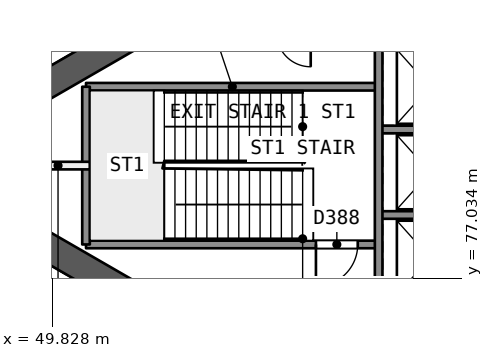
"""IFC4 building model, lengths in metres.
Left out: names, types, materials, properties, quantities, classifications, styles, units other than length and angle.
Written with IfcOpenShell. Run it as: python <this file> out.ifc"""

import sys

from ifc_helpers import new_model, si_unit, direction, frame, frame_2d, origin, place, context, subcontext, project, spatial, rectangle, extrude, element, fill, save


model = new_model("IFC4")
c1 = context("Model", 3, precision=1e-05, world=origin(), true_north=direction((0.0, 1.0)))
c2 = subcontext(c1, "Body", "Model", "MODEL_VIEW")
j1 = project(units=[si_unit("LENGTHUNIT", "METRE"), si_unit("PLANEANGLEUNIT", "RADIAN")], contexts=[c1])
p1 = place(None, origin())
s1 = spatial("IfcSite", under=j1, at=p1, CompositionType="ELEMENT")
p2 = place(p1, origin())
s2 = spatial("IfcBuilding", under=s1, at=p2, CompositionType="ELEMENT")
p3 = place(p2, frame((0.0, 0.0, 68.4)))
s3 = spatial("IfcBuildingStorey", under=s2, at=p3, CompositionType="ELEMENT", Elevation=68.4)
p4 = place(p3, frame((60.673, 88.477, 0.0), z_axis=(0.0, 0.0, 1.0), x_axis=(-0.8660248072, -0.500001033313, 0.0)))
e1 = element("IfcWall", 1, at=p4, inside=s3, PredefinedType="SHEAR", context=c2, shape_type="SweptSolid", body=[
    extrude(rectangle(XDim=13.958, YDim=0.75, at=frame_2d((6.979, 0.0))), origin(), (0.0, 0.0, 1.0), 3.7),
])
p5 = place(p3, frame((48.772, 78.394, 0.0), z_axis=(0.0, 0.0, 1.0), x_axis=(0.866028339916, -0.499994914436, 0.0)))
e2 = element("IfcWall", 2, at=p5, inside=s3, PredefinedType="SHEAR", context=c2, shape_type="SweptSolid", body=[
    extrude(rectangle(XDim=14.117, YDim=0.75, at=frame_2d((7.059, 0.0))), origin(), (0.0, 0.0, 1.0), 3.7),
])
p6 = place(p3, frame((38.832, 83.049, 0.0), z_axis=(0.0, 0.0, 1.0), x_axis=(0.866024382485, 0.500001768939, 0.0)))
e3 = element("IfcWall", 3, at=p6, inside=s3, PredefinedType="SOLIDWALL", context=c2, shape_type="SweptSolid", body=[
    extrude(rectangle(XDim=59.596, YDim=0.3, at=frame_2d((29.798, 0.0))), origin(), (0.0, 0.0, 1.0), 3.2),
])
p7 = place(p6, frame((27.507, 0.0, 0.0)))
e4 = element("IfcOpeningElement", 4, at=p7, cuts=e3, PredefinedType="OPENING", context=c2, shape_type="SweptSolid", body=[
    extrude(rectangle(XDim=2.4, YDim=2.4, at=frame_2d((1.2, 1.2))), frame((0.0, 0.161, 0.0), z_axis=(0.0, -1.0, 0.0), x_axis=(1.0, 0.0, 0.0)), (0.0, 0.0, 1.0), 0.321),
])
p8 = place(p6, frame((22.83, 0.0, 0.0)))
e5 = element("IfcOpeningElement", 5, at=p8, cuts=e3, PredefinedType="OPENING", context=c2, shape_type="SweptSolid", body=[
    extrude(rectangle(XDim=2.4, YDim=2.4, at=frame_2d((1.2, 1.2))), frame((0.0, 0.161, 0.0), z_axis=(0.0, -1.0, 0.0), x_axis=(1.0, 0.0, 0.0)), (0.0, 0.0, 1.0), 0.321),
])
p9 = place(p6, frame((10.995, 0.0, 0.0)))
e6 = element("IfcOpeningElement", 6, at=p9, cuts=e3, PredefinedType="OPENING", context=c2, shape_type="SweptSolid", body=[
    extrude(rectangle(XDim=2.4, YDim=2.4, at=frame_2d((1.2, 1.2))), frame((0.0, 0.161, 0.0), z_axis=(0.0, -1.0, 0.0), x_axis=(1.0, 0.0, 0.0)), (0.0, 0.0, 1.0), 0.321),
])
p10 = place(p6, frame((44.32, 0.0, 0.0)))
e7 = element("IfcOpeningElement", 7, at=p10, cuts=e3, PredefinedType="OPENING", context=c2, shape_type="SweptSolid", body=[
    extrude(rectangle(XDim=2.4, YDim=2.4, at=frame_2d((1.2, 1.2))), frame((0.0, 0.161, 0.0), z_axis=(0.0, -1.0, 0.0), x_axis=(1.0, 0.0, 0.0)), (0.0, 0.0, 1.0), 0.321),
])
p11 = place(p3, frame((90.443, 47.153, 0.0), z_axis=(0.0, 0.0, 1.0), x_axis=(-0.866024382485, 0.500001768939, 0.0)))
e8 = element("IfcWall", 8, at=p11, inside=s3, PredefinedType="SOLIDWALL", context=c2, shape_type="SweptSolid", body=[
    extrude(rectangle(XDim=59.596, YDim=0.3, at=frame_2d((29.798, 0.0))), origin(), (0.0, 0.0, 1.0), 3.2),
])
p12 = place(p11, frame((28.91, 0.0, 0.0)))
e9 = element("IfcOpeningElement", 9, at=p12, cuts=e8, PredefinedType="OPENING", context=c2, shape_type="SweptSolid", body=[
    extrude(rectangle(XDim=2.4, YDim=2.4, at=frame_2d((1.2, 1.2))), frame((0.0, 0.161, 0.0), z_axis=(0.0, -1.0, 0.0), x_axis=(1.0, 0.0, 0.0)), (0.0, 0.0, 1.0), 0.321),
])
p13 = place(p11, frame((33.586, 0.0, 0.0)))
e10 = element("IfcOpeningElement", 10, at=p13, cuts=e8, PredefinedType="OPENING", context=c2, shape_type="SweptSolid", body=[
    extrude(rectangle(XDim=2.4, YDim=2.4, at=frame_2d((1.2, 1.2))), frame((0.0, 0.161, 0.0), z_axis=(0.0, -1.0, 0.0), x_axis=(1.0, 0.0, 0.0)), (0.0, 0.0, 1.0), 0.321),
])
p14 = place(p11, frame((46.23, 0.0, 0.0)))
e11 = element("IfcOpeningElement", 11, at=p14, cuts=e8, PredefinedType="OPENING", context=c2, shape_type="SweptSolid", body=[
    extrude(rectangle(XDim=2.4, YDim=2.4, at=frame_2d((1.2, 1.2))), frame((0.0, 0.161, 0.0), z_axis=(0.0, -1.0, 0.0), x_axis=(1.0, 0.0, 0.0)), (0.0, 0.0, 1.0), 0.321),
])
p15 = place(p11, frame((12.876, 0.0, 0.0)))
e12 = element("IfcOpeningElement", 12, at=p15, cuts=e8, PredefinedType="OPENING", context=c2, shape_type="SweptSolid", body=[
    extrude(rectangle(XDim=2.4, YDim=2.4, at=frame_2d((1.2, 1.2))), frame((0.0, 0.161, 0.0), z_axis=(0.0, -1.0, 0.0), x_axis=(1.0, 0.0, 0.0)), (0.0, 0.0, 1.0), 0.321),
])
p16 = place(p3, frame((58.42, 82.075, 0.0), z_axis=(0.0, 0.0, 1.0), x_axis=(-1.0, 0.0, 0.0)))
e13 = element("IfcWall", 13, at=p16, inside=s3, PredefinedType="SOLIDWALL", context=c2, shape_type="SweptSolid", body=[
    extrude(rectangle(XDim=7.7, YDim=0.2, at=frame_2d((3.85, 0.0))), origin(), (0.0, 0.0, 1.0), 3.2),
])
p17 = place(p3, frame((60.9, 80.95, 0.0), z_axis=(0.0, 0.0, 1.0), x_axis=(-1.0, 0.0, 0.0)))
e14 = element("IfcWall", 14, at=p17, inside=s3, PredefinedType="SOLIDWALL", context=c2, shape_type="SweptSolid", body=[
    extrude(rectangle(XDim=2.48, YDim=0.2, at=frame_2d((1.24, 0.0))), origin(), (0.0, 0.0, 1.0), 3.2),
])
p18 = place(p3, frame((50.82, 80.0, 0.0), z_axis=(0.0, 0.0, 1.0), x_axis=(-1.0, 0.0, 0.0)))
e15 = element("IfcWall", 15, at=p18, inside=s3, PredefinedType="PARTITIONING", context=c2, shape_type="SweptSolid", body=[
    extrude(rectangle(XDim=1.673, YDim=0.2, at=frame_2d((0.836, 0.0))), origin(), (0.0, 0.0, 1.0), 3.2),
])
p19 = place(p3, frame((60.9, 78.7, 0.0), z_axis=(0.0, 0.0, 1.0), x_axis=(-1.0, 0.0, 0.0)))
e16 = element("IfcWall", 16, at=p19, inside=s3, PredefinedType="SOLIDWALL", context=c2, shape_type="SweptSolid", body=[
    extrude(rectangle(XDim=2.48, YDim=0.2, at=frame_2d((1.24, 0.0))), origin(), (0.0, 0.0, 1.0), 3.2),
])
p20 = place(p3, frame((58.42, 77.925, 0.0), z_axis=(0.0, 0.0, 1.0), x_axis=(-1.0, 0.0, 0.0)))
e17 = element("IfcWall", 17, at=p20, inside=s3, PredefinedType="SOLIDWALL", context=c2, shape_type="SweptSolid", body=[
    extrude(rectangle(XDim=7.7, YDim=0.2, at=frame_2d((3.85, 0.0))), origin(), (0.0, 0.0, 1.0), 3.2),
])
p21 = place(p20, frame((0.55, 0.0, 0.0)))
e18 = element("IfcOpeningElement", 18, at=p21, cuts=e17, PredefinedType="OPENING", context=c2, shape_type="SweptSolid", body=[
    extrude(rectangle(XDim=1.1, YDim=2.1, at=frame_2d((0.55, 1.05))), frame((0.0, 0.11, 0.0), z_axis=(0.0, -1.0, 0.0), x_axis=(1.0, 0.0, 0.0)), (0.0, 0.0, 1.0), 0.221),
])
p22 = place(p3, frame((58.42, 85.45, 0.0), z_axis=(0.0, 0.0, 1.0), x_axis=(0.0, -1.0, 0.0)))
e19 = element("IfcWall", 19, at=p22, inside=s3, PredefinedType="SOLIDWALL", context=c2, shape_type="SweptSolid", body=[
    extrude(rectangle(XDim=9.0, YDim=0.2, at=frame_2d((4.5, 0.0))), origin(), (0.0, 0.0, 1.0), 3.2),
])
p23 = place(p3, frame((50.72, 82.075, 0.0), z_axis=(0.0, 0.0, 1.0), x_axis=(0.0, -1.0, 0.0)))
e20 = element("IfcWall", 20, at=p23, inside=s3, PredefinedType="SOLIDWALL", context=c2, shape_type="SweptSolid", body=[
    extrude(rectangle(XDim=4.15, YDim=0.2, at=frame_2d((2.075, 0.0))), origin(), (0.0, 0.0, 1.0), 3.2),
])
p24 = place(p21, origin())
e21 = element("IfcDoor", 21, at=p24, inside=s3, OperationType="SINGLE_SWING_RIGHT", PredefinedType="NOTDEFINED", context=c2, shape_type="SweptSolid", body=[
    extrude(rectangle(XDim=1.1, YDim=2.1, at=frame_2d((0.55, 1.05))), frame((0.0, 0.025, 0.0), z_axis=(0.0, -1.0, 0.0), x_axis=(1.0, 0.0, 0.0)), (0.0, 0.0, 1.0), 0.05),
])
fill(e18, e21)
save(model, sys.argv[1])
